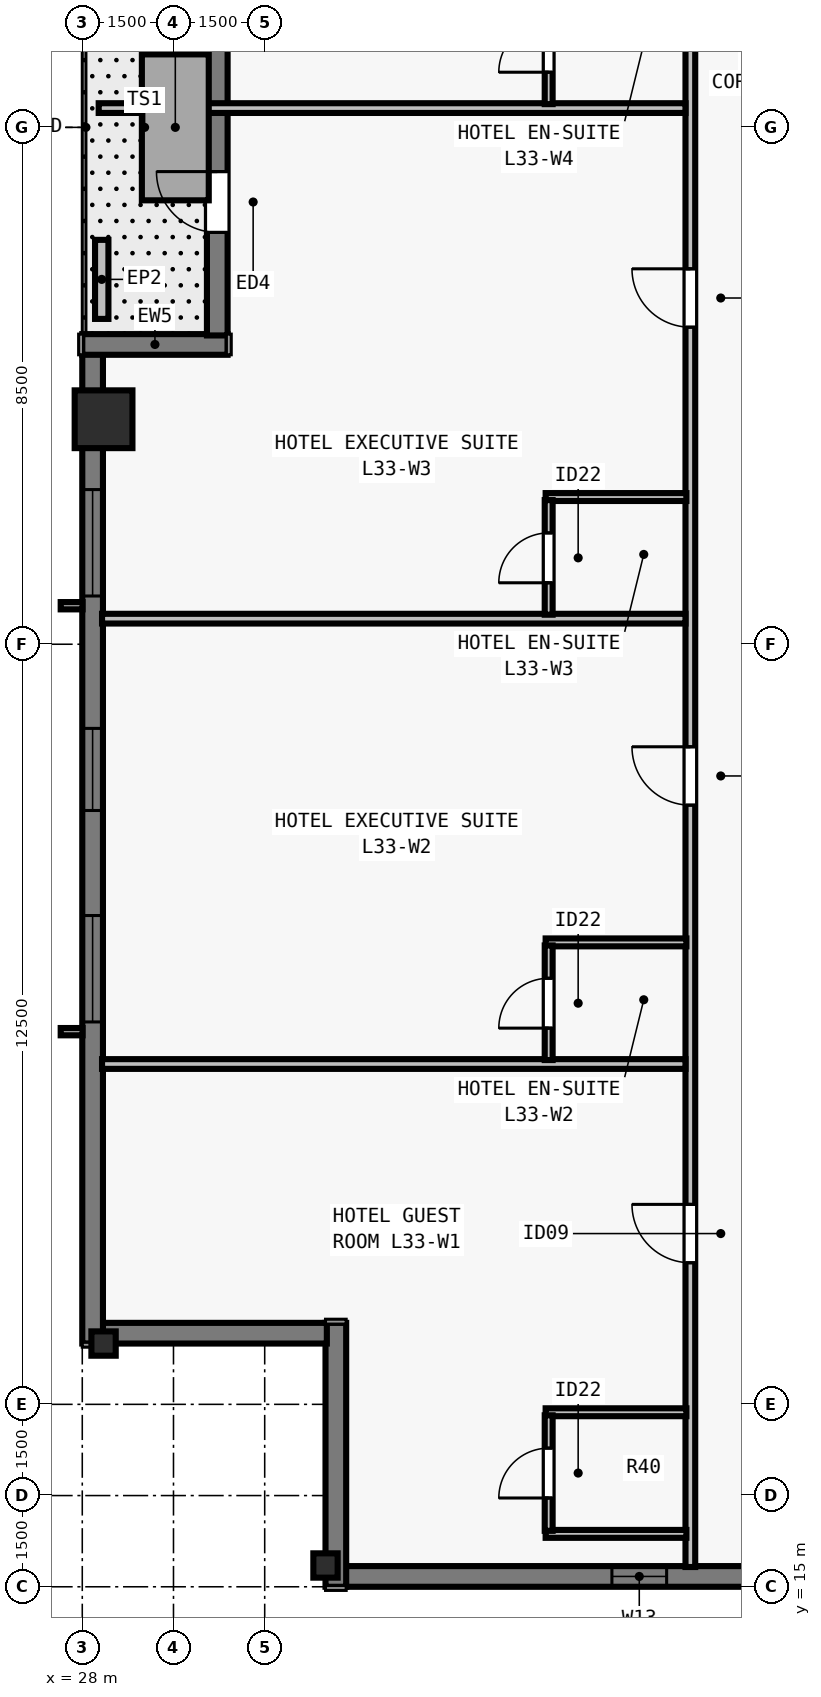
"""IFC4 building model, lengths in metres.
Left out: names, types, materials, properties, quantities, classifications, styles, units other than length and angle.
Written with IfcOpenShell. Run it as: python <this file> out.ifc"""

import sys

from ifc_helpers import new_model, si_unit, direction, frame, frame_2d, origin, origin_2d, place, context, subcontext, project, spatial, rectangle, i_section, extrude, element, fill, save


model = new_model("IFC4")
c1 = context("Model", 3, precision=1e-05, world=origin(), true_north=direction((0.0, 1.0)))
c2 = subcontext(c1, "Body", "Model", "MODEL_VIEW")
j1 = project(units=[si_unit("LENGTHUNIT", "METRE"), si_unit("PLANEANGLEUNIT", "RADIAN")], contexts=[c1])
p1 = place(None, origin())
s1 = spatial("IfcSite", under=j1, at=p1, CompositionType="ELEMENT")
p2 = place(p1, origin())
s2 = spatial("IfcBuilding", under=s1, at=p2, CompositionType="ELEMENT")
p3 = place(p2, frame((0.0, 0.0, 123.5)))
s3 = spatial("IfcBuildingStorey", under=s2, at=p3, CompositionType="ELEMENT", Elevation=123.5)
p4 = place(p3, frame((32.0, 15.35, 0.0), z_axis=(0.0, 0.0, 1.0), x_axis=(1.0, 0.0, 0.0)))
e1 = element("IfcColumn", 1, at=p4, inside=s3, PredefinedType="COLUMN", context=c2, shape_type="SweptSolid", body=[
    extrude(i_section(OverallWidth=0.4, OverallDepth=0.4, WebThickness=0.022, FlangeThickness=0.036, at=origin_2d()), origin(), (0.0, 0.0, 1.0), 3.5),
])
p5 = place(p3, frame((28.35, 34.2, 0.0), z_axis=(0.0, 0.0, 1.0), x_axis=(0.0, 1.0, 0.0)))
e2 = element("IfcColumn", 2, at=p5, inside=s3, PredefinedType="COLUMN", context=c2, shape_type="SweptSolid", body=[
    extrude(rectangle(XDim=0.95, YDim=0.95, at=origin_2d()), origin(), (0.0, 0.0, 1.0), 3.5),
])
p6 = place(p3, frame((28.35, 19.0, 0.0), z_axis=(0.0, 0.0, 1.0), x_axis=(0.0, 1.0, 0.0)))
e3 = element("IfcColumn", 3, at=p6, inside=s3, PredefinedType="COLUMN", context=c2, shape_type="SweptSolid", body=[
    extrude(i_section(OverallWidth=0.4, OverallDepth=0.4, WebThickness=0.022, FlangeThickness=0.036, at=origin_2d()), origin(), (0.0, 0.0, 1.0), 3.5),
])
p7 = place(p3, frame((72.0, 15.17, 0.0), z_axis=(0.0, 0.0, 1.0), x_axis=(-1.0, 0.0, 0.0)))
e4 = element("IfcWall", 4, at=p7, inside=s3, PredefinedType="SOLIDWALL", context=c2, shape_type="SweptSolid", body=[
    extrude(rectangle(XDim=39.682, YDim=0.34, at=frame_2d((19.841, 0.0))), origin(), (0.0, 0.0, 1.0), 3.28),
])
p8 = place(p7, frame((11.859, 0.0, 0.8)))
e5 = element("IfcOpeningElement", 5, at=p8, cuts=e4, PredefinedType="OPENING", context=c2, shape_type="SweptSolid", body=[
    extrude(rectangle(XDim=1.75, YDim=1.66, at=frame_2d((0.875, 0.83))), frame((0.0, 0.18, 0.0), z_axis=(0.0, -1.0, 0.0), x_axis=(1.0, 0.0, 0.0)), (0.0, 0.0, 1.0), 0.36),
])
p9 = place(p7, frame((16.062, 0.0, 0.8)))
e6 = element("IfcOpeningElement", 6, at=p9, cuts=e4, PredefinedType="OPENING", context=c2, shape_type="SweptSolid", body=[
    extrude(rectangle(XDim=1.35, YDim=1.66, at=frame_2d((0.675, 0.83))), frame((0.0, 0.18, 0.0), z_axis=(0.0, -1.0, 0.0), x_axis=(1.0, 0.0, 0.0)), (0.0, 0.0, 1.0), 0.36),
])
p10 = place(p7, frame((18.966, 0.0, 0.8)))
e7 = element("IfcOpeningElement", 7, at=p10, cuts=e4, PredefinedType="OPENING", context=c2, shape_type="SweptSolid", body=[
    extrude(rectangle(XDim=1.75, YDim=1.66, at=frame_2d((0.875, 0.83))), frame((0.0, 0.18, 0.0), z_axis=(0.0, -1.0, 0.0), x_axis=(1.0, 0.0, 0.0)), (0.0, 0.0, 1.0), 0.36),
])
p11 = place(p7, frame((21.469, 0.0, 0.8)))
e8 = element("IfcOpeningElement", 8, at=p11, cuts=e4, PredefinedType="OPENING", context=c2, shape_type="SweptSolid", body=[
    extrude(rectangle(XDim=1.35, YDim=1.66, at=frame_2d((0.675, 0.83))), frame((0.0, 0.18, 0.0), z_axis=(0.0, -1.0, 0.0), x_axis=(1.0, 0.0, 0.0)), (0.0, 0.0, 1.0), 0.36),
])
p12 = place(p7, frame((27.323, 0.0, 0.8)))
e9 = element("IfcOpeningElement", 9, at=p12, cuts=e4, PredefinedType="OPENING", context=c2, shape_type="SweptSolid", body=[
    extrude(rectangle(XDim=1.75, YDim=1.66, at=frame_2d((0.875, 0.83))), frame((0.0, 0.18, 0.0), z_axis=(0.0, -1.0, 0.0), x_axis=(1.0, 0.0, 0.0)), (0.0, 0.0, 1.0), 0.36),
])
p13 = place(p7, frame((29.827, 0.0, 0.8)))
e10 = element("IfcOpeningElement", 10, at=p13, cuts=e4, PredefinedType="OPENING", context=c2, shape_type="SweptSolid", body=[
    extrude(rectangle(XDim=1.35, YDim=1.66, at=frame_2d((0.675, 0.83))), frame((0.0, 0.18, 0.0), z_axis=(0.0, -1.0, 0.0), x_axis=(1.0, 0.0, 0.0)), (0.0, 0.0, 1.0), 0.36),
])
p14 = place(p7, frame((25.43, 0.0, 0.8)))
e11 = element("IfcOpeningElement", 11, at=p14, cuts=e4, PredefinedType="OPENING", context=c2, shape_type="SweptSolid", body=[
    extrude(rectangle(XDim=0.9, YDim=1.66, at=frame_2d((0.45, 0.83))), frame((0.0, 0.18, 0.0), z_axis=(0.0, -1.0, 0.0), x_axis=(1.0, 0.0, 0.0)), (0.0, 0.0, 1.0), 0.36),
])
p15 = place(p7, frame((34.39, 0.0, 0.8)))
e12 = element("IfcOpeningElement", 12, at=p15, cuts=e4, PredefinedType="OPENING", context=c2, shape_type="SweptSolid", body=[
    extrude(rectangle(XDim=0.9, YDim=1.66, at=frame_2d((0.45, 0.83))), frame((0.0, 0.18, 0.0), z_axis=(0.0, -1.0, 0.0), x_axis=(1.0, 0.0, 0.0)), (0.0, 0.0, 1.0), 0.36),
])
p16 = place(p3, frame((32.17, 15.0, 0.0), z_axis=(0.0, 0.0, 1.0), x_axis=(0.0, 1.0, 0.0)))
e13 = element("IfcWall", 13, at=p16, inside=s3, PredefinedType="SOLIDWALL", context=c2, shape_type="SweptSolid", body=[
    extrude(rectangle(XDim=4.34, YDim=0.34, at=frame_2d((2.17, 0.0))), origin(), (0.0, 0.0, 1.0), 3.28),
])
p17 = place(p3, frame((32.022, 19.17, 0.0), z_axis=(0.0, 0.0, 1.0), x_axis=(-1.0, 0.0, 0.0)))
e14 = element("IfcWall", 14, at=p17, inside=s3, PredefinedType="SOLIDWALL", context=c2, shape_type="SweptSolid", body=[
    extrude(rectangle(XDim=3.704, YDim=0.34, at=frame_2d((1.852, 0.0))), origin(), (0.0, 0.0, 1.0), 3.28),
])
p18 = place(p3, frame((28.17, 19.0, 0.0), z_axis=(0.0, 0.0, 1.0), x_axis=(0.0, 1.0, 0.0)))
e15 = element("IfcWall", 15, at=p18, inside=s3, PredefinedType="SOLIDWALL", context=c2, shape_type="SweptSolid", body=[
    extrude(rectangle(XDim=16.282, YDim=0.34, at=frame_2d((8.141, 0.0))), origin(), (0.0, 0.0, 1.0), 3.28),
])
p19 = place(p18, frame((5.289, 0.0, 0.8)))
e16 = element("IfcOpeningElement", 16, at=p19, cuts=e15, PredefinedType="OPENING", context=c2, shape_type="SweptSolid", body=[
    extrude(rectangle(XDim=1.75, YDim=1.66, at=frame_2d((0.875, 0.83))), frame((0.0, 0.18, 0.0), z_axis=(0.0, -1.0, 0.0), x_axis=(1.0, 0.0, 0.0)), (0.0, 0.0, 1.0), 0.36),
])
p20 = place(p18, frame((8.766, 0.0, 0.8)))
e17 = element("IfcOpeningElement", 17, at=p20, cuts=e15, PredefinedType="OPENING", context=c2, shape_type="SweptSolid", body=[
    extrude(rectangle(XDim=1.35, YDim=1.66, at=frame_2d((0.675, 0.83))), frame((0.0, 0.18, 0.0), z_axis=(0.0, -1.0, 0.0), x_axis=(1.0, 0.0, 0.0)), (0.0, 0.0, 1.0), 0.36),
])
p21 = place(p18, frame((12.293, 0.0, 0.8)))
e18 = element("IfcOpeningElement", 18, at=p21, cuts=e15, PredefinedType="OPENING", context=c2, shape_type="SweptSolid", body=[
    extrude(rectangle(XDim=1.75, YDim=1.66, at=frame_2d((0.875, 0.83))), frame((0.0, 0.18, 0.0), z_axis=(0.0, -1.0, 0.0), x_axis=(1.0, 0.0, 0.0)), (0.0, 0.0, 1.0), 0.36),
])
p22 = place(p3, frame((28.0, 35.43, 0.0), z_axis=(0.0, 0.0, 1.0), x_axis=(1.0, 0.0, 0.0)))
e19 = element("IfcWall", 19, at=p22, inside=s3, PredefinedType="SOLIDWALL", context=c2, shape_type="SweptSolid", body=[
    extrude(rectangle(XDim=2.39, YDim=0.34, at=frame_2d((1.195, 0.0))), origin(), (0.0, 0.0, 1.0), 3.28),
])
p23 = place(p3, frame((30.22, 35.578, 0.0), z_axis=(0.0, 0.0, 1.0), x_axis=(0.0, 1.0, 0.0)))
e20 = element("IfcWall", 20, at=p23, inside=s3, PredefinedType="SOLIDWALL", context=c2, shape_type="SweptSolid", body=[
    extrude(rectangle(XDim=7.162, YDim=0.34, at=frame_2d((3.581, 0.0))), origin(), (0.0, 0.0, 1.0), 3.28),
])
p24 = place(p23, frame((1.694, 0.0, 0.0)))
e21 = element("IfcOpeningElement", 21, at=p24, cuts=e20, PredefinedType="OPENING", context=c2, shape_type="SweptSolid", body=[
    extrude(rectangle(XDim=1.0, YDim=2.15, at=frame_2d((0.5, 1.075))), frame((0.0, 0.18, 0.0), z_axis=(0.0, -1.0, 0.0), x_axis=(1.0, 0.0, 0.0)), (0.0, 0.0, 1.0), 0.36),
])
p25 = place(p3, frame((28.32, 35.85, 0.0), z_axis=(0.0, 0.0, 1.0), x_axis=(0.0, 1.0, 0.0)))
e22 = element("IfcWall", 22, at=p25, inside=s3, PredefinedType="PARAPET", context=c2, shape_type="SweptSolid", body=[
    extrude(rectangle(XDim=1.3, YDim=0.22, at=frame_2d((0.65, 0.0))), origin(), (0.0, 0.0, 1.0), 0.55),
])
p26 = place(p3, frame((38.0, 15.325, 0.0), z_axis=(0.0, 0.0, 1.0), x_axis=(0.0, 1.0, 0.0)))
e23 = element("IfcWall", 23, at=p26, inside=s3, PredefinedType="PARTITIONING", context=c2, shape_type="SweptSolid", body=[
    extrude(rectangle(XDim=47.35, YDim=0.16, at=frame_2d((23.675, 0.0))), origin(), (0.0, 0.0, 1.0), 2.555),
])
p27 = place(p26, frame((5.003, 0.0, 0.0)))
e24 = element("IfcOpeningElement", 24, at=p27, cuts=e23, PredefinedType="OPENING", context=c2, shape_type="SweptSolid", body=[
    extrude(rectangle(XDim=0.96, YDim=2.15, at=frame_2d((0.48, 1.075))), frame((0.0, 0.09, 0.0), z_axis=(0.0, -1.0, 0.0), x_axis=(1.0, 0.0, 0.0)), (0.0, 0.0, 1.0), 0.18),
])
p28 = place(p26, frame((12.529, 0.0, 0.0)))
e25 = element("IfcOpeningElement", 25, at=p28, cuts=e23, PredefinedType="OPENING", context=c2, shape_type="SweptSolid", body=[
    extrude(rectangle(XDim=0.96, YDim=2.15, at=frame_2d((0.48, 1.075))), frame((0.0, 0.09, 0.0), z_axis=(0.0, -1.0, 0.0), x_axis=(1.0, 0.0, 0.0)), (0.0, 0.0, 1.0), 0.18),
])
p29 = place(p26, frame((20.389, 0.0, 0.0)))
e26 = element("IfcOpeningElement", 26, at=p29, cuts=e23, PredefinedType="OPENING", context=c2, shape_type="SweptSolid", body=[
    extrude(rectangle(XDim=0.96, YDim=2.15, at=frame_2d((0.48, 1.075))), frame((0.0, 0.09, 0.0), z_axis=(0.0, -1.0, 0.0), x_axis=(1.0, 0.0, 0.0)), (0.0, 0.0, 1.0), 0.18),
])
p30 = place(p26, frame((28.249, 0.0, 0.0)))
e27 = element("IfcOpeningElement", 27, at=p30, cuts=e23, PredefinedType="OPENING", context=c2, shape_type="SweptSolid", body=[
    extrude(rectangle(XDim=0.96, YDim=2.15, at=frame_2d((0.48, 1.075))), frame((0.0, 0.09, 0.0), z_axis=(0.0, -1.0, 0.0), x_axis=(1.0, 0.0, 0.0)), (0.0, 0.0, 1.0), 0.18),
])
p31 = place(p26, frame((36.109, 0.0, 0.0)))
e28 = element("IfcOpeningElement", 28, at=p31, cuts=e23, PredefinedType="OPENING", context=c2, shape_type="SweptSolid", body=[
    extrude(rectangle(XDim=0.96, YDim=2.15, at=frame_2d((0.48, 1.075))), frame((0.0, 0.09, 0.0), z_axis=(0.0, -1.0, 0.0), x_axis=(1.0, 0.0, 0.0)), (0.0, 0.0, 1.0), 0.18),
])
p32 = place(p26, frame((44.079, 0.0, 0.0)))
e29 = element("IfcOpeningElement", 29, at=p32, cuts=e23, PredefinedType="OPENING", context=c2, shape_type="SweptSolid", body=[
    extrude(rectangle(XDim=0.96, YDim=2.15, at=frame_2d((0.48, 1.075))), frame((0.0, 0.09, 0.0), z_axis=(0.0, -1.0, 0.0), x_axis=(1.0, 0.0, 0.0)), (0.0, 0.0, 1.0), 0.18),
])
for number, where, z_axis, x_axis in (
    (30, (35.62, 15.87, 0.0), (0.0, 0.0, 1.0), (1.0, 0.0, 0.0)),
    (31, (35.62, 17.87, 0.0), (0.0, 0.0, 1.0), (1.0, 0.0, 0.0)),
):
    element("IfcWall", number, at=place(p3, frame(where, z_axis=z_axis, x_axis=x_axis)), inside=s3, PredefinedType="PLUMBINGWALL", context=c2, shape_type="SweptSolid", body=[
        extrude(rectangle(XDim=2.315, YDim=0.13, at=frame_2d((1.157, 0.0))), origin(), (0.0, 0.0, 1.0), 3.28),
    ])
p33 = place(p3, frame((35.67, 15.92, 0.0), z_axis=(0.0, 0.0, 1.0), x_axis=(0.0, 1.0, 0.0)))
e32 = element("IfcWall", 32, at=p33, inside=s3, PredefinedType="PLUMBINGWALL", context=c2, shape_type="SweptSolid", body=[
    extrude(rectangle(XDim=1.9, YDim=0.13, at=frame_2d((0.95, 0.0))), origin(), (0.0, 0.0, 1.0), 3.28),
])
p34 = place(p33, frame((0.54, 0.0, 0.0)))
e33 = element("IfcOpeningElement", 33, at=p34, cuts=e32, PredefinedType="OPENING", context=c2, shape_type="SweptSolid", body=[
    extrude(rectangle(XDim=0.82, YDim=2.1, at=frame_2d((0.41, 1.05))), frame((0.0, 0.075, 0.0), z_axis=(0.0, -1.0, 0.0), x_axis=(1.0, 0.0, 0.0)), (0.0, 0.0, 1.0), 0.15),
])
p35 = place(p3, frame((28.325, 23.597, 0.0), z_axis=(0.0, 0.0, 1.0), x_axis=(1.0, 0.0, 0.0)))
e34 = element("IfcWall", 34, at=p35, inside=s3, PredefinedType="PARTITIONING", context=c2, shape_type="SweptSolid", body=[
    extrude(rectangle(XDim=9.595, YDim=0.16, at=frame_2d((4.797, 0.0))), origin(), (0.0, 0.0, 1.0), 2.896),
])
p36 = place(p3, frame((35.62, 25.597, 0.0), z_axis=(0.0, 0.0, 1.0), x_axis=(1.0, 0.0, 0.0)))
e35 = element("IfcWall", 35, at=p36, inside=s3, PredefinedType="PLUMBINGWALL", context=c2, shape_type="SweptSolid", body=[
    extrude(rectangle(XDim=2.315, YDim=0.13, at=frame_2d((1.157, 0.0))), origin(), (0.0, 0.0, 1.0), 2.896),
])
p37 = place(p3, frame((35.67, 23.662, 0.0), z_axis=(0.0, 0.0, 1.0), x_axis=(0.0, 1.0, 0.0)))
e36 = element("IfcWall", 36, at=p37, inside=s3, PredefinedType="PLUMBINGWALL", context=c2, shape_type="SweptSolid", body=[
    extrude(rectangle(XDim=1.885, YDim=0.13, at=frame_2d((0.942, 0.0))), origin(), (0.0, 0.0, 1.0), 3.28),
])
p38 = place(p37, frame((0.525, 0.0, 0.0)))
e37 = element("IfcOpeningElement", 37, at=p38, cuts=e36, PredefinedType="OPENING", context=c2, shape_type="SweptSolid", body=[
    extrude(rectangle(XDim=0.82, YDim=2.1, at=frame_2d((0.41, 1.05))), frame((0.0, 0.075, 0.0), z_axis=(0.0, -1.0, 0.0), x_axis=(1.0, 0.0, 0.0)), (0.0, 0.0, 1.0), 0.15),
])
p39 = place(p3, frame((28.325, 30.921, 0.0), z_axis=(0.0, 0.0, 1.0), x_axis=(1.0, 0.0, 0.0)))
e38 = element("IfcWall", 38, at=p39, inside=s3, PredefinedType="PARTITIONING", context=c2, shape_type="SweptSolid", body=[
    extrude(rectangle(XDim=9.595, YDim=0.16, at=frame_2d((4.797, 0.0))), origin(), (0.0, 0.0, 1.0), 3.28),
])
p40 = place(p3, frame((35.62, 32.921, 0.0), z_axis=(0.0, 0.0, 1.0), x_axis=(1.0, 0.0, 0.0)))
e39 = element("IfcWall", 39, at=p40, inside=s3, PredefinedType="PLUMBINGWALL", context=c2, shape_type="SweptSolid", body=[
    extrude(rectangle(XDim=2.315, YDim=0.13, at=frame_2d((1.157, 0.0))), origin(), (0.0, 0.0, 1.0), 3.28),
])
p41 = place(p3, frame((35.67, 30.986, 0.0), z_axis=(0.0, 0.0, 1.0), x_axis=(0.0, 1.0, 0.0)))
e40 = element("IfcWall", 40, at=p41, inside=s3, PredefinedType="PLUMBINGWALL", context=c2, shape_type="SweptSolid", body=[
    extrude(rectangle(XDim=1.885, YDim=0.13, at=frame_2d((0.942, 0.0))), origin(), (0.0, 0.0, 1.0), 3.28),
])
p42 = place(p41, frame((0.525, 0.0, 0.0)))
e41 = element("IfcOpeningElement", 41, at=p42, cuts=e40, PredefinedType="OPENING", context=c2, shape_type="SweptSolid", body=[
    extrude(rectangle(XDim=0.82, YDim=2.1, at=frame_2d((0.41, 1.05))), frame((0.0, 0.075, 0.0), z_axis=(0.0, -1.0, 0.0), x_axis=(1.0, 0.0, 0.0)), (0.0, 0.0, 1.0), 0.15),
])
p43 = place(p3, frame((28.27, 39.317, 0.0), z_axis=(0.0, 0.0, 1.0), x_axis=(1.0, 0.0, 0.0)))
e42 = element("IfcWall", 42, at=p43, inside=s3, PredefinedType="PARTITIONING", context=c2, shape_type="SweptSolid", body=[
    extrude(rectangle(XDim=9.65, YDim=0.16, at=frame_2d((4.825, 0.0))), origin(), (0.0, 0.0, 1.0), 2.896),
])
p44 = place(p3, frame((35.67, 39.382, 0.0), z_axis=(0.0, 0.0, 1.0), x_axis=(0.0, 1.0, 0.0)))
e43 = element("IfcWall", 43, at=p44, inside=s3, PredefinedType="PLUMBINGWALL", context=c2, shape_type="SweptSolid", body=[
    extrude(rectangle(XDim=1.885, YDim=0.13, at=frame_2d((0.942, 0.0))), origin(), (0.0, 0.0, 1.0), 3.28),
])
p45 = place(p44, frame((0.525, 0.0, 0.0)))
e44 = element("IfcOpeningElement", 44, at=p45, cuts=e43, PredefinedType="OPENING", context=c2, shape_type="SweptSolid", body=[
    extrude(rectangle(XDim=0.82, YDim=2.1, at=frame_2d((0.41, 1.05))), frame((0.0, 0.075, 0.0), z_axis=(0.0, -1.0, 0.0), x_axis=(1.0, 0.0, 0.0)), (0.0, 0.0, 1.0), 0.15),
])
p46 = place(p19, origin())
e45 = element("IfcWindow", 45, at=p46, inside=s3, PartitioningType="SINGLE_PANEL", PredefinedType="WINDOW", context=c2, shape_type="SweptSolid", body=[
    extrude(rectangle(XDim=1.75, YDim=1.66, at=frame_2d((0.875, 0.83))), frame((0.0, -0.05, 0.0), z_axis=(0.0, -1.0, 0.0), x_axis=(1.0, 0.0, 0.0)), (0.0, 0.0, 1.0), 0.06),
])
fill(e16, e45)
p47 = place(p20, origin())
e46 = element("IfcWindow", 46, at=p47, inside=s3, PartitioningType="SINGLE_PANEL", PredefinedType="WINDOW", context=c2, shape_type="SweptSolid", body=[
    extrude(rectangle(XDim=1.35, YDim=1.66, at=frame_2d((0.675, 0.83))), frame((0.0, -0.05, 0.0), z_axis=(0.0, -1.0, 0.0), x_axis=(1.0, 0.0, 0.0)), (0.0, 0.0, 1.0), 0.06),
])
fill(e17, e46)
p48 = place(p21, origin())
e47 = element("IfcWindow", 47, at=p48, inside=s3, PartitioningType="SINGLE_PANEL", PredefinedType="WINDOW", context=c2, shape_type="SweptSolid", body=[
    extrude(rectangle(XDim=1.75, YDim=1.66, at=frame_2d((0.875, 0.83))), frame((0.0, -0.05, 0.0), z_axis=(0.0, -1.0, 0.0), x_axis=(1.0, 0.0, 0.0)), (0.0, 0.0, 1.0), 0.06),
])
fill(e18, e47)
p49 = place(p24, origin())
e48 = element("IfcDoor", 48, at=p49, inside=s3, OperationType="SINGLE_SWING_RIGHT", PredefinedType="DOOR", context=c2, shape_type="SweptSolid", body=[
    extrude(rectangle(XDim=1.0, YDim=2.15, at=frame_2d((0.5, 1.075))), frame((0.0, 0.025, 0.0), z_axis=(0.0, -1.0, 0.0), x_axis=(1.0, 0.0, 0.0)), (0.0, 0.0, 1.0), 0.05),
])
fill(e21, e48)
p50 = place(p15, origin())
e49 = element("IfcWindow", 49, at=p50, inside=s3, PartitioningType="SINGLE_PANEL", PredefinedType="WINDOW", context=c2, shape_type="SweptSolid", body=[
    extrude(rectangle(XDim=0.9, YDim=1.66, at=frame_2d((0.45, 0.83))), frame((0.0, -0.04, 0.0), z_axis=(0.0, -1.0, 0.0), x_axis=(1.0, 0.0, 0.0)), (0.0, 0.0, 1.0), 0.06),
])
fill(e12, e49)
p51 = place(p34, origin())
e50 = element("IfcDoor", 50, at=p51, inside=s3, OperationType="SINGLE_SWING_LEFT", PredefinedType="DOOR", context=c2, shape_type="SweptSolid", body=[
    extrude(rectangle(XDim=0.82, YDim=2.1, at=frame_2d((0.41, 1.05))), frame((0.0, 0.025, 0.0), z_axis=(0.0, -1.0, 0.0), x_axis=(1.0, 0.0, 0.0)), (0.0, 0.0, 1.0), 0.05),
])
fill(e33, e50)
p52 = place(p27, origin())
e51 = element("IfcDoor", 51, at=p52, inside=s3, OperationType="SINGLE_SWING_RIGHT", PredefinedType="DOOR", context=c2, shape_type="SweptSolid", body=[
    extrude(rectangle(XDim=0.96, YDim=2.15, at=frame_2d((0.48, 1.075))), frame((0.0, 0.025, 0.0), z_axis=(0.0, -1.0, 0.0), x_axis=(1.0, 0.0, 0.0)), (0.0, 0.0, 1.0), 0.05),
])
fill(e24, e51)
p53 = place(p38, origin())
e52 = element("IfcDoor", 52, at=p53, inside=s3, OperationType="SINGLE_SWING_LEFT", PredefinedType="DOOR", context=c2, shape_type="SweptSolid", body=[
    extrude(rectangle(XDim=0.82, YDim=2.1, at=frame_2d((0.41, 1.05))), frame((0.0, 0.025, 0.0), z_axis=(0.0, -1.0, 0.0), x_axis=(1.0, 0.0, 0.0)), (0.0, 0.0, 1.0), 0.05),
])
fill(e37, e52)
p54 = place(p28, origin())
e53 = element("IfcDoor", 53, at=p54, inside=s3, OperationType="SINGLE_SWING_RIGHT", PredefinedType="DOOR", context=c2, shape_type="SweptSolid", body=[
    extrude(rectangle(XDim=0.96, YDim=2.15, at=frame_2d((0.48, 1.075))), frame((0.0, 0.025, 0.0), z_axis=(0.0, -1.0, 0.0), x_axis=(1.0, 0.0, 0.0)), (0.0, 0.0, 1.0), 0.05),
])
fill(e25, e53)
p55 = place(p42, origin())
e54 = element("IfcDoor", 54, at=p55, inside=s3, OperationType="SINGLE_SWING_LEFT", PredefinedType="DOOR", context=c2, shape_type="SweptSolid", body=[
    extrude(rectangle(XDim=0.82, YDim=2.1, at=frame_2d((0.41, 1.05))), frame((0.0, 0.025, 0.0), z_axis=(0.0, -1.0, 0.0), x_axis=(1.0, 0.0, 0.0)), (0.0, 0.0, 1.0), 0.05),
])
fill(e41, e54)
p56 = place(p29, origin())
e55 = element("IfcDoor", 55, at=p56, inside=s3, OperationType="SINGLE_SWING_RIGHT", PredefinedType="DOOR", context=c2, shape_type="SweptSolid", body=[
    extrude(rectangle(XDim=0.96, YDim=2.15, at=frame_2d((0.48, 1.075))), frame((0.0, 0.025, 0.0), z_axis=(0.0, -1.0, 0.0), x_axis=(1.0, 0.0, 0.0)), (0.0, 0.0, 1.0), 0.05),
])
fill(e26, e55)
p57 = place(p45, origin())
e56 = element("IfcDoor", 56, at=p57, inside=s3, OperationType="SINGLE_SWING_LEFT", PredefinedType="DOOR", context=c2, shape_type="SweptSolid", body=[
    extrude(rectangle(XDim=0.82, YDim=2.1, at=frame_2d((0.41, 1.05))), frame((0.0, 0.025, 0.0), z_axis=(0.0, -1.0, 0.0), x_axis=(1.0, 0.0, 0.0)), (0.0, 0.0, 1.0), 0.05),
])
fill(e44, e56)
save(model, sys.argv[1])
